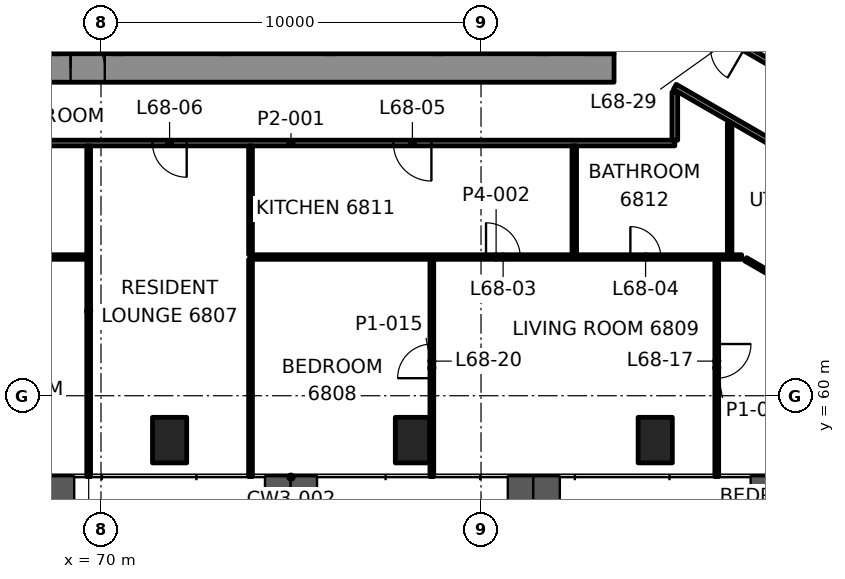
"""IFC4 building model, lengths in metres.
Left out: names, types, materials, properties, quantities, classifications, styles, units other than length and angle.
Written with IfcOpenShell. Run it as: python <this file> out.ifc"""

import sys

from ifc_helpers import new_model, si_unit, direction, frame, frame_2d, origin, origin_2d, place, context, subcontext, project, spatial, rectangle, hollow_rectangle, extrude, element, fill, save


model = new_model("IFC4")
c1 = context("Model", 3, precision=1e-05, world=origin(), true_north=direction((0.0, 1.0)))
c2 = subcontext(c1, "Body", "Model", "MODEL_VIEW")
j1 = project(units=[si_unit("LENGTHUNIT", "METRE"), si_unit("PLANEANGLEUNIT", "RADIAN")], contexts=[c1])
p1 = place(None, origin())
s1 = spatial("IfcSite", under=j1, at=p1, CompositionType="ELEMENT")
p2 = place(p1, origin())
s2 = spatial("IfcBuilding", under=s1, at=p2, CompositionType="ELEMENT")
p3 = place(p2, frame((0.0, 0.0, 284.6)))
s3 = spatial("IfcBuildingStorey", under=s2, at=p3, CompositionType="ELEMENT", Elevation=284.6)
for number, where, z_axis, x_axis in (
    (1, (71.805, 58.832, -0.0), (0.0, 0.0, 1.0), (1.0, 0.0, 0.0)),
    (2, (78.195, 58.832, -0.0), (0.0, 0.0, 1.0), (1.0, 0.0, 0.0)),
    (3, (84.584, 58.832, -0.0), (0.0, 0.0, 1.0), (1.0, 0.0, 0.0)),
):
    element("IfcColumn", number, at=place(p3, frame(where, z_axis=z_axis, x_axis=x_axis)), inside=s3, PredefinedType="COLUMN", context=c2, shape_type="SweptSolid", body=[
        extrude(hollow_rectangle(XDim=0.9, YDim=1.2, WallThickness=0.06, at=origin_2d()), origin(), (0.0, 0.0, 1.0), 3.5),
    ])
p4 = place(p3, frame((66.5, 68.625, 0.0), z_axis=(0.0, 0.0, 1.0), x_axis=(1.0, 0.0, 0.0)))
e4 = element("IfcWall", 4, at=p4, inside=s3, PredefinedType="SHEAR", context=c2, shape_type="SweptSolid", body=[
    extrude(rectangle(XDim=17.0, YDim=0.75, at=frame_2d((8.5, 0.0))), origin(), (0.0, 0.0, 1.0), 3.3),
])
p5 = place(p4, frame((2.7, 0.0, 0.0)))
e5 = element("IfcOpeningElement", 5, at=p5, cuts=e4, PredefinedType="OPENING", context=c2, shape_type="SweptSolid", body=[
    extrude(rectangle(XDim=0.9, YDim=2.1, at=frame_2d((0.45, 1.05))), frame((0.0, 0.385, 0.0), z_axis=(0.0, -1.0, 0.0), x_axis=(1.0, 0.0, 0.0)), (0.0, 0.0, 1.0), 0.77),
])
p6 = place(p3, frame((83.125, 69.0, 0.0), z_axis=(0.0, 0.0, 1.0), x_axis=(0.0, 1.0, 0.0)))
e6 = element("IfcWall", 6, at=p6, inside=s3, PredefinedType="SHEAR", context=c2, shape_type="SweptSolid", body=[
    extrude(rectangle(XDim=12.0, YDim=0.75, at=frame_2d((6.0, 0.0))), origin(), (0.0, 0.0, 1.0), 3.3),
])
p7 = place(p6, frame((3.4, 0.0, 0.0)))
e7 = element("IfcOpeningElement", 7, at=p7, cuts=e6, PredefinedType="OPENING", context=c2, shape_type="SweptSolid", body=[
    extrude(rectangle(XDim=1.8, YDim=2.1, at=frame_2d((0.9, 1.05))), frame((0.0, 0.385, 0.0), z_axis=(0.0, -1.0, 0.0), x_axis=(1.0, 0.0, 0.0)), (0.0, 0.0, 1.0), 0.77),
])
for number, where, z_axis, x_axis in (
    (8, (70.45, 69.0, 0.0), (0.0, 0.0, 1.0), (0.0, 1.0, 0.0)),
    (9, (73.25, 69.0, 0.0), (0.0, 0.0, 1.0), (0.0, 1.0, 0.0)),
    (10, (76.05, 69.0, 0.0), (0.0, 0.0, 1.0), (0.0, 1.0, 0.0)),
    (11, (78.85, 69.0, 0.0), (0.0, 0.0, 1.0), (0.0, 1.0, 0.0)),
    (12, (81.65, 69.0, 0.0), (0.0, 0.0, 1.0), (0.0, 1.0, 0.0)),
):
    element("IfcWall", number, at=place(p3, frame(where, z_axis=z_axis, x_axis=x_axis)), inside=s3, PredefinedType="SHEAR", context=c2, shape_type="SweptSolid", body=[
        extrude(rectangle(XDim=2.6, YDim=0.3, at=frame_2d((1.3, 0.0))), origin(), (0.0, 0.0, 1.0), 3.3),
    ])
p8 = place(p3, frame((63.261, 63.65, 0.0), z_axis=(0.0, 0.0, 1.0), x_axis=(1.0, 0.0, 0.0)))
e13 = element("IfcWall", 13, at=p8, inside=s3, PredefinedType="PARTITIONING", context=c2, shape_type="SweptSolid", body=[
    extrude(rectangle(XDim=6.364, YDim=0.12, at=frame_2d((3.182, 0.0))), origin(), (0.0, 0.0, 1.0), 2.7),
])
p9 = place(p8, frame((0.37, 0.0, 0.0)))
e14 = element("IfcOpeningElement", 14, at=p9, cuts=e13, PredefinedType="OPENING", context=c2, shape_type="SweptSolid", body=[
    extrude(rectangle(XDim=0.8, YDim=2.1, at=frame_2d((0.4, 1.05))), frame((0.0, 0.07, 0.0), z_axis=(0.0, -1.0, 0.0), x_axis=(1.0, 0.0, 0.0)), (0.0, 0.0, 1.0), 0.14),
])
p10 = place(p8, frame((3.609, 0.0, 0.0)))
e15 = element("IfcOpeningElement", 15, at=p10, cuts=e13, PredefinedType="OPENING", context=c2, shape_type="SweptSolid", body=[
    extrude(rectangle(XDim=0.9, YDim=2.1, at=frame_2d((0.45, 1.05))), frame((0.0, 0.07, 0.0), z_axis=(0.0, -1.0, 0.0), x_axis=(1.0, 0.0, 0.0)), (0.0, 0.0, 1.0), 0.14),
])
p11 = place(p3, frame((73.935, 63.65, 0.0), z_axis=(0.0, 0.0, 1.0), x_axis=(1.0, 0.0, 0.0)))
e16 = element("IfcWall", 16, at=p11, inside=s3, PredefinedType="PARTITIONING", context=c2, shape_type="SweptSolid", body=[
    extrude(rectangle(XDim=12.924, YDim=0.12, at=frame_2d((6.462, 0.0))), origin(), (0.0, 0.0, 1.0), 2.7),
])
p12 = place(p11, frame((6.197, 0.0, 0.0)))
e17 = element("IfcOpeningElement", 17, at=p12, cuts=e16, PredefinedType="OPENING", context=c2, shape_type="SweptSolid", body=[
    extrude(rectangle(XDim=0.9, YDim=2.1, at=frame_2d((0.45, 1.05))), frame((0.0, 0.07, 0.0), z_axis=(0.0, -1.0, 0.0), x_axis=(1.0, 0.0, 0.0)), (0.0, 0.0, 1.0), 0.14),
])
p13 = place(p11, frame((9.995, 0.0, 0.0)))
e18 = element("IfcOpeningElement", 18, at=p13, cuts=e16, PredefinedType="OPENING", context=c2, shape_type="SweptSolid", body=[
    extrude(rectangle(XDim=0.8, YDim=2.1, at=frame_2d((0.4, 1.05))), frame((0.0, 0.07, 0.0), z_axis=(0.0, -1.0, 0.0), x_axis=(1.0, 0.0, 0.0)), (0.0, 0.0, 1.0), 0.14),
])
p14 = place(p3, frame((85.1, 66.65, 0.0), z_axis=(0.0, 0.0, 1.0), x_axis=(-1.0, 0.0, 0.0)))
e19 = element("IfcWall", 19, at=p14, inside=s3, PredefinedType="PARTITIONING", context=c2, shape_type="SweptSolid", body=[
    extrude(rectangle(XDim=20.2, YDim=0.15, at=frame_2d((10.1, 0.0))), origin(), (0.0, 0.0, 1.0), 2.7),
])
p15 = place(p14, frame((6.405, 0.0, 0.0)))
e20 = element("IfcOpeningElement", 20, at=p15, cuts=e19, PredefinedType="OPENING", context=c2, shape_type="SweptSolid", body=[
    extrude(rectangle(XDim=1.0, YDim=2.1, at=frame_2d((0.5, 1.05))), frame((0.0, 0.085, 0.0), z_axis=(0.0, -1.0, 0.0), x_axis=(1.0, 0.0, 0.0)), (0.0, 0.0, 1.0), 0.17),
])
p16 = place(p14, frame((12.845, 0.0, 0.0)))
e21 = element("IfcOpeningElement", 21, at=p16, cuts=e19, PredefinedType="OPENING", context=c2, shape_type="SweptSolid", body=[
    extrude(rectangle(XDim=0.9, YDim=2.1, at=frame_2d((0.45, 1.05))), frame((0.0, 0.085, 0.0), z_axis=(0.0, -1.0, 0.0), x_axis=(1.0, 0.0, 0.0)), (0.0, 0.0, 1.0), 0.17),
])
p17 = place(p3, frame((86.542, 63.71, 0.0), z_axis=(0.0, 0.0, 1.0), x_axis=(0.0, 1.0, 0.0)))
e22 = element("IfcWall", 22, at=p17, inside=s3, PredefinedType="PARTITIONING", context=c2, shape_type="SweptSolid", body=[
    extrude(rectangle(XDim=3.46, YDim=0.12, at=frame_2d((1.73, 0.0))), origin(), (0.0, 0.0, 1.0), 2.547),
])
p18 = place(p3, frame((86.203, 63.59, 0.0), z_axis=(0.0, 0.0, 1.0), x_axis=(0.0, -1.0, 0.0)))
e23 = element("IfcWall", 23, at=p18, inside=s3, PredefinedType="PARTITIONING", context=c2, shape_type="SweptSolid", body=[
    extrude(rectangle(XDim=5.718, YDim=0.1, at=frame_2d((2.859, 0.0))), origin(), (0.0, 0.0, 1.0), 2.7),
])
p19 = place(p18, frame((2.229, 0.0, 0.0)))
e24 = element("IfcOpeningElement", 24, at=p19, cuts=e23, PredefinedType="OPENING", context=c2, shape_type="SweptSolid", body=[
    extrude(rectangle(XDim=0.9, YDim=2.1, at=frame_2d((0.45, 1.05))), frame((0.0, 0.06, 0.0), z_axis=(0.0, -1.0, 0.0), x_axis=(1.0, 0.0, 0.0)), (0.0, 0.0, 1.0), 0.12),
])
p20 = place(p3, frame((85.1, 66.725, 0.0), z_axis=(0.0, 0.0, 1.0), x_axis=(0.0, 1.0, 0.0)))
e25 = element("IfcWall", 25, at=p20, inside=s3, PredefinedType="PARTITIONING", context=c2, shape_type="SweptSolid", body=[
    extrude(rectangle(XDim=1.268, YDim=0.15, at=frame_2d((0.634, 0.0))), origin(), (0.0, 0.0, 1.0), 2.547),
])
p21 = place(p3, frame((82.454, 63.71, 0.0), z_axis=(0.0, 0.0, 1.0), x_axis=(0.0, 1.0, 0.0)))
e26 = element("IfcWall", 26, at=p21, inside=s3, PredefinedType="PARTITIONING", context=c2, shape_type="SweptSolid", body=[
    extrude(rectangle(XDim=2.865, YDim=0.12, at=frame_2d((1.433, 0.0))), origin(), (0.0, 0.0, 1.0), 2.7),
])
p22 = place(p3, frame((78.706, 57.872, 0.0), z_axis=(0.0, 0.0, 1.0), x_axis=(0.0, 1.0, 0.0)))
e27 = element("IfcWall", 27, at=p22, inside=s3, PredefinedType="PARTITIONING", context=c2, shape_type="SweptSolid", body=[
    extrude(rectangle(XDim=5.718, YDim=0.1, at=frame_2d((2.859, 0.0))), origin(), (0.0, 0.0, 1.0), 2.688),
])
p23 = place(p22, frame((2.589, 0.0, 0.0)))
e28 = element("IfcOpeningElement", 28, at=p23, cuts=e27, PredefinedType="OPENING", context=c2, shape_type="SweptSolid", body=[
    extrude(rectangle(XDim=0.9, YDim=2.1, at=frame_2d((0.45, 1.05))), frame((0.0, 0.06, 0.0), z_axis=(0.0, -1.0, 0.0), x_axis=(1.0, 0.0, 0.0)), (0.0, 0.0, 1.0), 0.12),
])
p24 = place(p3, frame((73.935, 57.872, 0.0), z_axis=(0.0, 0.0, 1.0), x_axis=(0.0, 1.0, 0.0)))
e29 = element("IfcWall", 29, at=p24, inside=s3, PredefinedType="PARTITIONING", context=c2, shape_type="SweptSolid", body=[
    extrude(rectangle(XDim=5.718, YDim=0.1, at=frame_2d((2.859, 0.0))), origin(), (0.0, 0.0, 1.0), 2.688),
])
p25 = place(p3, frame((69.676, 57.872, 0.0), z_axis=(0.0, 0.0, 1.0), x_axis=(0.0, 1.0, 0.0)))
e30 = element("IfcWall", 30, at=p25, inside=s3, PredefinedType="PARTITIONING", context=c2, shape_type="SweptSolid", body=[
    extrude(rectangle(XDim=8.703, YDim=0.1, at=frame_2d((4.352, 0.0))), origin(), (0.0, 0.0, 1.0), 2.688),
])
p26 = place(p3, frame((97.014, 63.329, 0.0), z_axis=(0.0, 0.0, 1.0), x_axis=(-0.866023045711, 0.500004084281, 0.0)))
e31 = element("IfcWall", 31, at=p26, inside=s3, PredefinedType="PARTITIONING", context=c2, shape_type="SweptSolid", body=[
    extrude(rectangle(XDim=13.757, YDim=0.15, at=frame_2d((6.879, 0.0))), origin(), (0.0, 0.0, 1.0), 2.7),
])
p27 = place(p26, frame((1.39, 0.0, 0.0)))
e32 = element("IfcOpeningElement", 32, at=p27, cuts=e31, PredefinedType="OPENING", context=c2, shape_type="SweptSolid", body=[
    extrude(rectangle(XDim=0.9, YDim=2.1, at=frame_2d((0.45, 1.05))), frame((0.0, 0.085, 0.0), z_axis=(0.0, -1.0, 0.0), x_axis=(1.0, 0.0, 0.0)), (0.0, 0.0, 1.0), 0.17),
])
p28 = place(p26, frame((4.821, 0.0, 0.0)))
e33 = element("IfcOpeningElement", 33, at=p28, cuts=e31, PredefinedType="OPENING", context=c2, shape_type="SweptSolid", body=[
    extrude(rectangle(XDim=1.0, YDim=2.1, at=frame_2d((0.5, 1.05))), frame((0.0, 0.085, 0.0), z_axis=(0.0, -1.0, 0.0), x_axis=(1.0, 0.0, 0.0)), (0.0, 0.0, 1.0), 0.17),
])
p29 = place(p26, frame((11.634, 0.0, 0.0)))
e34 = element("IfcOpeningElement", 34, at=p29, cuts=e31, PredefinedType="OPENING", context=c2, shape_type="SweptSolid", body=[
    extrude(rectangle(XDim=0.9, YDim=2.1, at=frame_2d((0.45, 1.05))), frame((0.0, 0.085, 0.0), z_axis=(0.0, -1.0, 0.0), x_axis=(1.0, 0.0, 0.0)), (0.0, 0.0, 1.0), 0.17),
])
p30 = place(p3, frame((96.114, 61.771, 0.0), z_axis=(0.0, 0.0, 1.0), x_axis=(-0.866021912989, 0.500006046186, 0.0)))
e35 = element("IfcWall", 35, at=p30, inside=s3, PredefinedType="PARTITIONING", context=c2, shape_type="SweptSolid", body=[
    extrude(rectangle(XDim=12.718, YDim=0.15, at=frame_2d((6.359, 0.0))), origin(), (0.0, 0.0, 1.0), 2.547),
])
p31 = place(p3, frame((86.963, 63.59, 0.0), z_axis=(0.0, 0.0, 1.0), x_axis=(0.866028993663, -0.499993782096, 0.0)))
e36 = element("IfcWall", 36, at=p31, inside=s3, PredefinedType="PARTITIONING", context=c2, shape_type="SweptSolid", body=[
    extrude(rectangle(XDim=4.543, YDim=0.1, at=frame_2d((2.272, 0.0))), origin(), (0.0, 0.0, 1.0), 2.7),
])
p32 = place(p31, frame((1.822, 0.0, 0.0)))
e37 = element("IfcOpeningElement", 37, at=p32, cuts=e36, PredefinedType="OPENING", context=c2, shape_type="SweptSolid", body=[
    extrude(rectangle(XDim=0.9, YDim=2.1, at=frame_2d((0.45, 1.05))), frame((0.0, 0.06, 0.0), z_axis=(0.0, -1.0, 0.0), x_axis=(1.0, 0.0, 0.0)), (0.0, 0.0, 1.0), 0.12),
])
p33 = place(p3, frame((73.935, 63.71, 0.0), z_axis=(0.0, 0.0, 1.0), x_axis=(0.0, 1.0, 0.0)))
e38 = element("IfcWall", 38, at=p33, inside=s3, PredefinedType="PARTITIONING", context=c2, shape_type="SweptSolid", body=[
    extrude(rectangle(XDim=2.865, YDim=0.1, at=frame_2d((1.433, 0.0))), origin(), (0.0, 0.0, 1.0), 2.7),
])
p34 = place(p3, frame((68.85, 69.0, 0.0), z_axis=(0.0, 0.0, 1.0), x_axis=(0.0, 1.0, 0.0)))
e39 = element("IfcWall", 39, at=p34, inside=s3, PredefinedType="PARTITIONING", context=c2, shape_type="SweptSolid", body=[
    extrude(rectangle(XDim=2.65, YDim=0.2, at=frame_2d((1.325, 0.0))), origin(), (0.0, 0.0, 1.0), 3.3),
])
p35 = place(p12, origin())
e40 = element("IfcDoor", 40, at=p35, inside=s3, OperationType="SINGLE_SWING_RIGHT", PredefinedType="DOOR", context=c2, shape_type="SweptSolid", body=[
    extrude(rectangle(XDim=0.9, YDim=2.1, at=frame_2d((0.45, 1.05))), frame((0.0, 0.025, 0.0), z_axis=(0.0, -1.0, 0.0), x_axis=(1.0, 0.0, 0.0)), (0.0, 0.0, 1.0), 0.05),
])
fill(e17, e40)
p36 = place(p13, origin())
e41 = element("IfcDoor", 41, at=p36, inside=s3, OperationType="SINGLE_SWING_LEFT", PredefinedType="DOOR", context=c2, shape_type="SweptSolid", body=[
    extrude(rectangle(XDim=0.8, YDim=2.1, at=frame_2d((0.4, 1.05))), frame((0.0, 0.025, 0.0), z_axis=(0.0, -1.0, 0.0), x_axis=(1.0, 0.0, 0.0)), (0.0, 0.0, 1.0), 0.05),
])
fill(e18, e41)
p37 = place(p15, origin())
e42 = element("IfcDoor", 42, at=p37, inside=s3, OperationType="SINGLE_SWING_RIGHT", PredefinedType="DOOR", context=c2, shape_type="SweptSolid", body=[
    extrude(rectangle(XDim=1.0, YDim=2.1, at=frame_2d((0.5, 1.05))), frame((0.0, 0.025, 0.0), z_axis=(0.0, -1.0, 0.0), x_axis=(1.0, 0.0, 0.0)), (0.0, 0.0, 1.0), 0.05),
])
fill(e20, e42)
p38 = place(p16, origin())
e43 = element("IfcDoor", 43, at=p38, inside=s3, OperationType="SINGLE_SWING_LEFT", PredefinedType="DOOR", context=c2, shape_type="SweptSolid", body=[
    extrude(rectangle(XDim=0.9, YDim=2.1, at=frame_2d((0.45, 1.05))), frame((0.0, 0.025, 0.0), z_axis=(0.0, -1.0, 0.0), x_axis=(1.0, 0.0, 0.0)), (0.0, 0.0, 1.0), 0.05),
])
fill(e21, e43)
p39 = place(p19, origin())
e44 = element("IfcDoor", 44, at=p39, inside=s3, OperationType="SINGLE_SWING_LEFT", PredefinedType="DOOR", context=c2, shape_type="SweptSolid", body=[
    extrude(rectangle(XDim=0.9, YDim=2.1, at=frame_2d((0.45, 1.05))), frame((0.0, 0.025, 0.0), z_axis=(0.0, -1.0, 0.0), x_axis=(1.0, 0.0, 0.0)), (0.0, 0.0, 1.0), 0.05),
])
fill(e24, e44)
p40 = place(p23, origin())
e45 = element("IfcDoor", 45, at=p40, inside=s3, OperationType="SINGLE_SWING_LEFT", PredefinedType="DOOR", context=c2, shape_type="SweptSolid", body=[
    extrude(rectangle(XDim=0.9, YDim=2.1, at=frame_2d((0.45, 1.05))), frame((0.0, 0.025, 0.0), z_axis=(0.0, -1.0, 0.0), x_axis=(1.0, 0.0, 0.0)), (0.0, 0.0, 1.0), 0.05),
])
fill(e28, e45)
p41 = place(p5, origin())
e46 = element("IfcDoor", 46, at=p41, inside=s3, OperationType="SINGLE_SWING_LEFT", PredefinedType="DOOR", context=c2, shape_type="SweptSolid", body=[
    extrude(rectangle(XDim=0.9, YDim=2.1, at=frame_2d((0.45, 1.05))), frame((0.0, 0.095, 0.0), z_axis=(0.0, -1.0, 0.0), x_axis=(1.0, 0.0, 0.0)), (0.0, 0.0, 1.0), 0.19),
])
fill(e5, e46)
save(model, sys.argv[1])
